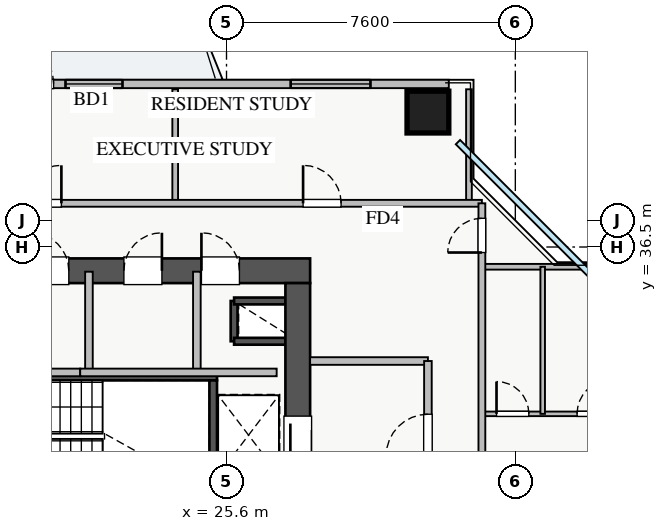
"""IFC4 building model, lengths in metres.
Left out: names, types, materials, properties, quantities, classifications, styles, units other than length and angle.
Written with IfcOpenShell. Run it as: python <this file> out.ifc"""

import sys

from ifc_helpers import new_model, si_unit, direction, frame, frame_2d, origin, origin_2d, place, context, subcontext, project, spatial, rectangle, extrude, source, transform, mapped, element, fill, save


model = new_model("IFC4")
c1 = context("Model", 3, precision=1e-05, world=origin(), true_north=direction((0.0, 1.0)))
c2 = subcontext(c1, "Body", "Model", "MODEL_VIEW")
j1 = project(units=[si_unit("LENGTHUNIT", "METRE"), si_unit("PLANEANGLEUNIT", "RADIAN")], contexts=[c1])
p1 = place(None, origin())
s1 = spatial("IfcSite", under=j1, at=p1, CompositionType="ELEMENT")
p2 = place(p1, origin())
s2 = spatial("IfcBuilding", under=s1, at=p2, CompositionType="ELEMENT")
p3 = place(p2, frame((0.0, 0.0, 110.0)))
s3 = spatial("IfcBuildingStorey", under=s2, at=p3, CompositionType="ELEMENT", Elevation=110.0)
p4 = place(p3, frame((25.8, 34.02, 0.0), z_axis=(0.0, 0.0, 1.0), x_axis=(0.0, 1.0, 0.0)))
e1 = element("IfcWall", 1, at=p4, inside=s3, PredefinedType="SHEAR", context=c2, shape_type="SweptSolid", body=[
    extrude(rectangle(XDim=1.06, YDim=0.18, at=frame_2d((0.53, 0.0))), origin(), (0.0, 0.0, 1.0), 3.07),
])
for number, where, z_axis, x_axis in (
    (2, (25.8, 35.08, 0.0), (0.0, 0.0, 1.0), (1.0, 0.0, 0.0)),
    (3, (25.8, 34.02, 0.0), (0.0, 0.0, 1.0), (1.0, 0.0, 0.0)),
):
    element("IfcWall", number, at=place(p3, frame(where, z_axis=z_axis, x_axis=x_axis)), inside=s3, PredefinedType="SHEAR", context=c2, shape_type="SweptSolid", body=[
        extrude(rectangle(XDim=1.35, YDim=0.18, at=frame_2d((0.675, 0.0))), origin(), (0.0, 0.0, 1.0), 3.07),
    ])
p5 = place(p3, frame((18.2, 33.09, 0.0), z_axis=(0.0, 0.0, 1.0), x_axis=(1.0, 0.0, 0.0)))
e4 = element("IfcWall", 4, at=p5, inside=s3, PredefinedType="SHEAR", context=c2, shape_type="SweptSolid", body=[
    extrude(rectangle(XDim=7.15, YDim=0.2, at=frame_2d((3.575, 0.0))), origin(), (0.0, 0.0, 1.0), 3.25),
])
p6 = place(p5, frame((0.35, 0.0, 0.0)))
e5 = element("IfcOpeningElement", 5, at=p6, cuts=e4, PredefinedType="OPENING", context=c2, shape_type="SweptSolid", body=[
    extrude(rectangle(XDim=1.1, YDim=2.05, at=frame_2d((0.55, 1.025))), frame((0.0, 0.11, 0.0), z_axis=(0.0, -1.0, 0.0), x_axis=(1.0, 0.0, 0.0)), (0.0, 0.0, 1.0), 0.22),
])
p7 = place(p3, frame((25.25, 30.05, 0.0), z_axis=(0.0, 0.0, 1.0), x_axis=(0.0, 1.0, 0.0)))
e6 = element("IfcWall", 6, at=p7, inside=s3, PredefinedType="SHEAR", context=c2, shape_type="SweptSolid", body=[
    extrude(rectangle(XDim=2.94, YDim=0.2, at=frame_2d((1.47, 0.0))), origin(), (0.0, 0.0, 1.0), 3.25),
])
p8 = place(p3, frame((10.2, 35.875, 0.0), z_axis=(0.0, 0.0, 1.0), x_axis=(1.0, 0.0, 0.0)))
e7 = element("IfcWall", 7, at=p8, inside=s3, PredefinedType="SHEAR", context=c2, shape_type="SweptSolid", body=[
    extrude(rectangle(XDim=17.6, YDim=0.65, at=frame_2d((8.8, 0.0))), origin(), (0.0, 0.0, 1.0), 3.25),
])
p9 = place(p8, frame((1.15, 0.0, 0.0)))
e8 = element("IfcOpeningElement", 8, at=p9, cuts=e7, PredefinedType="OPENING", context=c2, shape_type="SweptSolid", body=[
    extrude(rectangle(XDim=1.1, YDim=2.05, at=frame_2d((0.55, 1.025))), frame((0.0, 0.335, 0.0), z_axis=(0.0, -1.0, 0.0), x_axis=(1.0, 0.0, 0.0)), (0.0, 0.0, 1.0), 0.67),
])
p10 = place(p8, frame((8.3, 0.0, 0.0)))
e9 = element("IfcOpeningElement", 9, at=p10, cuts=e7, PredefinedType="OPENING", context=c2, shape_type="SweptSolid", body=[
    extrude(rectangle(XDim=1.1, YDim=2.05, at=frame_2d((0.55, 1.025))), frame((0.0, 0.335, 0.0), z_axis=(0.0, -1.0, 0.0), x_axis=(1.0, 0.0, 0.0)), (0.0, 0.0, 1.0), 0.67),
])
p11 = place(p8, frame((4.9, 0.0, 0.0)))
e10 = element("IfcOpeningElement", 10, at=p11, cuts=e7, PredefinedType="OPENING", context=c2, shape_type="SweptSolid", body=[
    extrude(rectangle(XDim=1.1, YDim=2.05, at=frame_2d((0.55, 1.025))), frame((0.0, 0.335, 0.0), z_axis=(0.0, -1.0, 0.0), x_axis=(1.0, 0.0, 0.0)), (0.0, 0.0, 1.0), 0.67),
])
p12 = place(p8, frame((14.74, 0.0, 0.0)))
e11 = element("IfcOpeningElement", 11, at=p12, cuts=e7, PredefinedType="OPENING", context=c2, shape_type="SweptSolid", body=[
    extrude(rectangle(XDim=1.0, YDim=2.05, at=frame_2d((0.5, 1.025))), frame((0.0, 0.335, 0.0), z_axis=(0.0, -1.0, 0.0), x_axis=(1.0, 0.0, 0.0)), (0.0, 0.0, 1.0), 0.67),
])
p13 = place(p8, frame((10.25, 0.0, 0.0)))
e12 = element("IfcOpeningElement", 12, at=p13, cuts=e7, PredefinedType="OPENING", context=c2, shape_type="SweptSolid", body=[
    extrude(rectangle(XDim=1.0, YDim=2.05, at=frame_2d((0.5, 1.025))), frame((0.0, 0.335, 0.0), z_axis=(0.0, -1.0, 0.0), x_axis=(1.0, 0.0, 0.0)), (0.0, 0.0, 1.0), 0.67),
])
p14 = place(p8, frame((12.7, 0.0, 0.0)))
e13 = element("IfcOpeningElement", 13, at=p14, cuts=e7, PredefinedType="OPENING", context=c2, shape_type="SweptSolid", body=[
    extrude(rectangle(XDim=1.0, YDim=2.05, at=frame_2d((0.5, 1.025))), frame((0.0, 0.335, 0.0), z_axis=(0.0, -1.0, 0.0), x_axis=(1.0, 0.0, 0.0)), (0.0, 0.0, 1.0), 0.67),
])
p15 = place(p3, frame((27.475, 29.65, 0.0), z_axis=(0.0, 0.0, 1.0), x_axis=(0.0, 1.0, 0.0)))
e14 = element("IfcWall", 14, at=p15, inside=s3, PredefinedType="SHEAR", context=c2, shape_type="SweptSolid", body=[
    extrude(rectangle(XDim=5.9, YDim=0.65, at=frame_2d((2.95, 0.0))), origin(), (0.0, 0.0, 1.0), 3.25),
])
p16 = place(p15, frame((1.1, 0.0, 0.0)))
e15 = element("IfcOpeningElement", 15, at=p16, cuts=e14, PredefinedType="OPENING", context=c2, shape_type="SweptSolid", body=[
    extrude(rectangle(XDim=1.3, YDim=2.05, at=frame_2d((0.65, 1.025))), frame((0.0, 0.335, 0.0), z_axis=(0.0, -1.0, 0.0), x_axis=(1.0, 0.0, 0.0)), (0.0, 0.0, 1.0), 0.67),
])
m1 = source(origin(), c2, "Body", "SweptSolid", [
    extrude(rectangle(XDim=1.1, YDim=1.1, at=origin_2d()), origin(), (0.0, 0.0, 1.0), 3.25),
])
p17 = place(p3, frame((30.9, 40.05, 0.0), z_axis=(0.0, 0.0, 1.0), x_axis=(1.0, 0.0, 0.0)))
e16 = element("IfcColumn", 16, at=p17, inside=s3, PredefinedType="COLUMN", context=c2, shape_type="MappedRepresentation", body=[
    mapped(m1, transform((0.0, 0.0, 0.0), x_axis=(1.0, 0.0, 0.0), y_axis=(0.0, 1.0, 0.0), z_axis=(0.0, 0.0, 1.0), scale=1.0)),
])
p18 = place(p3, frame((6.55, 40.79, 0.0), z_axis=(0.0, 0.0, 1.0), x_axis=(1.0, 0.0, 0.0)))
e17 = element("IfcWall", 17, at=p18, inside=s3, PredefinedType="STANDARD", context=c2, shape_type="SweptSolid", body=[
    extrude(rectangle(XDim=24.9, YDim=0.22, at=frame_2d((12.45, 0.0))), origin(), (0.0, 0.0, 1.0), 2.61),
])
p19 = place(p18, frame((13.3, 0.0, 0.0)))
e18 = element("IfcOpeningElement", 18, at=p19, cuts=e17, PredefinedType="OPENING", context=c2, shape_type="SweptSolid", body=[
    extrude(rectangle(XDim=1.2, YDim=2.1, at=frame_2d((0.6, 1.05))), frame((0.0, 0.12, 0.0), z_axis=(0.0, -1.0, 0.0), x_axis=(1.0, 0.0, 0.0)), (0.0, 0.0, 1.0), 0.24),
])
p20 = place(p18, frame((0.373, 0.0, 0.9)))
e19 = element("IfcOpeningElement", 19, at=p20, cuts=e17, PredefinedType="OPENING", context=c2, shape_type="SweptSolid", body=[
    extrude(rectangle(XDim=1.5, YDim=1.5, at=frame_2d((0.75, 0.75))), frame((0.0, 0.12, 0.0), z_axis=(0.0, -1.0, 0.0), x_axis=(1.0, 0.0, 0.0)), (0.0, 0.0, 1.0), 0.24),
])
p21 = place(p18, frame((8.438, 0.0, 0.9)))
e20 = element("IfcOpeningElement", 20, at=p21, cuts=e17, PredefinedType="OPENING", context=c2, shape_type="SweptSolid", body=[
    extrude(rectangle(XDim=1.8, YDim=1.45, at=frame_2d((0.9, 0.725))), frame((0.0, 0.12, 0.0), z_axis=(0.0, -1.0, 0.0), x_axis=(1.0, 0.0, 0.0)), (0.0, 0.0, 1.0), 0.24),
])
p22 = place(p18, frame((14.813, 0.0, 0.9)))
e21 = element("IfcOpeningElement", 21, at=p22, cuts=e17, PredefinedType="OPENING", context=c2, shape_type="SweptSolid", body=[
    extrude(rectangle(XDim=1.5, YDim=1.45, at=frame_2d((0.75, 0.725))), frame((0.0, 0.12, 0.0), z_axis=(0.0, -1.0, 0.0), x_axis=(1.0, 0.0, 0.0)), (0.0, 0.0, 1.0), 0.24),
])
p23 = place(p18, frame((20.738, 0.0, 0.9)))
e22 = element("IfcOpeningElement", 22, at=p23, cuts=e17, PredefinedType="OPENING", context=c2, shape_type="SweptSolid", body=[
    extrude(rectangle(XDim=2.1, YDim=1.48, at=frame_2d((1.05, 0.74))), frame((0.0, 0.12, 0.0), z_axis=(0.0, -1.0, 0.0), x_axis=(1.0, 0.0, 0.0)), (0.0, 0.0, 1.0), 0.24),
])
p24 = place(p18, frame((4.152, 0.0, 0.9)))
e23 = element("IfcOpeningElement", 23, at=p24, cuts=e17, PredefinedType="OPENING", context=c2, shape_type="SweptSolid", body=[
    extrude(rectangle(XDim=2.4, YDim=1.5, at=frame_2d((1.2, 0.75))), frame((0.0, 0.12, 0.0), z_axis=(0.0, -1.0, 0.0), x_axis=(1.0, 0.0, 0.0)), (0.0, 0.0, 1.0), 0.24),
])
p25 = place(p3, frame((27.8, 33.5, 0.0), z_axis=(0.0, 0.0, 1.0), x_axis=(1.0, 0.0, 0.0)))
e24 = element("IfcWall", 24, at=p25, inside=s3, PredefinedType="PARTITIONING", context=c2, shape_type="SweptSolid", body=[
    extrude(rectangle(XDim=3.1, YDim=0.2, at=frame_2d((1.55, 0.0))), origin(), (0.0, 0.0, 1.0), 3.07),
])
p26 = place(p3, frame((30.9, 29.6, 0.0), z_axis=(0.0, 0.0, 1.0), x_axis=(0.0, 1.0, 0.0)))
e25 = element("IfcWall", 25, at=p26, inside=s3, PredefinedType="PARTITIONING", context=c2, shape_type="SweptSolid", body=[
    extrude(rectangle(XDim=3.9, YDim=0.2, at=frame_2d((1.95, 0.0))), origin(), (0.0, 0.0, 1.0), 3.07),
])
p27 = place(p26, frame((1.4, 0.0, 0.0)))
e26 = element("IfcOpeningElement", 26, at=p27, cuts=e25, PredefinedType="OPENING", context=c2, shape_type="SweptSolid", body=[
    extrude(rectangle(XDim=1.1, YDim=2.05, at=frame_2d((0.55, 1.025))), frame((0.0, 0.11, 0.0), z_axis=(0.0, -1.0, 0.0), x_axis=(1.0, 0.0, 0.0)), (0.0, 0.0, 1.0), 0.22),
])
p28 = place(p3, frame((24.82, 33.2, 0.0), z_axis=(0.0, 0.0, 1.0), x_axis=(0.0, 1.0, 0.0)))
e27 = element("IfcWall", 27, at=p28, inside=s3, PredefinedType="PARTITIONING", context=c2, shape_type="SweptSolid", body=[
    extrude(rectangle(XDim=2.65, YDim=0.2, at=frame_2d((1.325, 0.0))), origin(), (0.0, 0.0, 1.0), 3.07),
])
p29 = place(p3, frame((19.88, 33.2, 0.0), z_axis=(0.0, 0.0, 1.0), x_axis=(1.0, 0.0, 0.0)))
e28 = element("IfcWall", 28, at=p29, inside=s3, PredefinedType="PARTITIONING", context=c2, shape_type="SweptSolid", body=[
    extrude(rectangle(XDim=1.87, YDim=0.2, at=frame_2d((0.935, 0.0))), origin(), (0.0, 0.0, 1.0), 3.07),
])
p30 = place(p3, frame((21.98, 33.2, 0.0), z_axis=(0.0, 0.0, 1.0), x_axis=(0.0, 1.0, 0.0)))
e29 = element("IfcWall", 29, at=p30, inside=s3, PredefinedType="PARTITIONING", context=c2, shape_type="SweptSolid", body=[
    extrude(rectangle(XDim=2.65, YDim=0.2, at=frame_2d((1.325, 0.0))), origin(), (0.0, 0.0, 1.0), 3.07),
])
p31 = place(p3, frame((21.75, 33.2, 0.0), z_axis=(0.0, 0.0, 1.0), x_axis=(1.0, 0.0, 0.0)))
e30 = element("IfcWall", 30, at=p31, inside=s3, PredefinedType="PARTITIONING", context=c2, shape_type="SweptSolid", body=[
    extrude(rectangle(XDim=5.17, YDim=0.2, at=frame_2d((2.585, 0.0))), origin(), (0.0, 0.0, 1.0), 3.07),
])
for number, where, z_axis, x_axis in (
    (31, (24.25, 37.65, 0.0), (0.0, 0.0, 1.0), (0.0, 1.0, 0.0)),
    (32, (31.98, 37.65, 0.0), (0.0, 0.0, 1.0), (0.0, 1.0, 0.0)),
):
    element("IfcWall", number, at=place(p3, frame(where, z_axis=z_axis, x_axis=x_axis)), inside=s3, PredefinedType="PARTITIONING", context=c2, shape_type="SweptSolid", body=[
        extrude(rectangle(XDim=3.0, YDim=0.15, at=frame_2d((1.5, 0.0))), origin(), (0.0, 0.0, 1.0), 3.07),
    ])
p32 = place(p3, frame((8.78, 37.65, 0.0), z_axis=(0.0, 0.0, 1.0), x_axis=(1.0, 0.0, 0.0)))
e33 = element("IfcWall", 33, at=p32, inside=s3, PredefinedType="PARTITIONING", context=c2, shape_type="SweptSolid", body=[
    extrude(rectangle(XDim=23.54, YDim=0.18, at=frame_2d((11.77, 0.0))), origin(), (0.0, 0.0, 1.0), 3.07),
])
p33 = place(p32, frame((3.74, 0.0, 0.0)))
e34 = element("IfcOpeningElement", 34, at=p33, cuts=e33, PredefinedType="OPENING", context=c2, shape_type="SweptSolid", body=[
    extrude(rectangle(XDim=1.0, YDim=2.05, at=frame_2d((0.5, 1.025))), frame((0.0, 0.1, 0.0), z_axis=(0.0, -1.0, 0.0), x_axis=(1.0, 0.0, 0.0)), (0.0, 0.0, 1.0), 0.2),
])
p34 = place(p32, frame((11.475, 0.0, 0.0)))
e35 = element("IfcOpeningElement", 35, at=p34, cuts=e33, PredefinedType="OPENING", context=c2, shape_type="SweptSolid", body=[
    extrude(rectangle(XDim=1.0, YDim=2.05, at=frame_2d((0.5, 1.025))), frame((0.0, 0.1, 0.0), z_axis=(0.0, -1.0, 0.0), x_axis=(1.0, 0.0, 0.0)), (0.0, 0.0, 1.0), 0.2),
])
p35 = place(p32, frame((18.835, 0.0, 0.0)))
e36 = element("IfcOpeningElement", 36, at=p35, cuts=e33, PredefinedType="OPENING", context=c2, shape_type="SweptSolid", body=[
    extrude(rectangle(XDim=1.0, YDim=2.05, at=frame_2d((0.5, 1.025))), frame((0.0, 0.1, 0.0), z_axis=(0.0, -1.0, 0.0), x_axis=(1.0, 0.0, 0.0)), (0.0, 0.0, 1.0), 0.2),
])
p36 = place(p3, frame((32.32, 35.98, 0.0), z_axis=(0.0, 0.0, 1.0), x_axis=(1.0, 0.0, 0.0)))
e37 = element("IfcWall", 37, at=p36, inside=s3, PredefinedType="PARTITIONING", context=c2, shape_type="SweptSolid", body=[
    extrude(rectangle(XDim=4.33, YDim=0.15, at=frame_2d((2.165, 0.0))), origin(), (0.0, 0.0, 1.0), 3.07),
])
p37 = place(p3, frame((32.32, 32.11, 0.0), z_axis=(0.0, 0.0, 1.0), x_axis=(1.0, 0.0, 0.0)))
e38 = element("IfcWall", 38, at=p37, inside=s3, PredefinedType="PLUMBINGWALL", context=c2, shape_type="SweptSolid", body=[
    extrude(rectangle(XDim=4.33, YDim=0.12, at=frame_2d((2.165, 0.0))), origin(), (0.0, 0.0, 1.0), 3.07),
])
p38 = place(p37, frame((0.385, 0.0, 0.0)))
e39 = element("IfcOpeningElement", 39, at=p38, cuts=e38, PredefinedType="OPENING", context=c2, shape_type="SweptSolid", body=[
    extrude(rectangle(XDim=0.85, YDim=2.05, at=frame_2d((0.425, 1.025))), frame((0.0, 0.07, 0.0), z_axis=(0.0, -1.0, 0.0), x_axis=(1.0, 0.0, 0.0)), (0.0, 0.0, 1.0), 0.14),
])
p39 = place(p37, frame((2.505, 0.0, 0.0)))
e40 = element("IfcOpeningElement", 40, at=p39, cuts=e38, PredefinedType="OPENING", context=c2, shape_type="SweptSolid", body=[
    extrude(rectangle(XDim=0.9, YDim=2.05, at=frame_2d((0.45, 1.025))), frame((0.0, 0.07, 0.0), z_axis=(0.0, -1.0, 0.0), x_axis=(1.0, 0.0, 0.0)), (0.0, 0.0, 1.0), 0.14),
])
p40 = place(p3, frame((33.92, 32.11, 0.0), z_axis=(0.0, 0.0, 1.0), x_axis=(0.0, 1.0, 0.0)))
e41 = element("IfcWall", 41, at=p40, inside=s3, PredefinedType="PLUMBINGWALL", context=c2, shape_type="SweptSolid", body=[
    extrude(rectangle(XDim=3.87, YDim=0.12, at=frame_2d((1.935, 0.0))), origin(), (0.0, 0.0, 1.0), 3.07),
])
p41 = place(p3, frame((32.32, 8.31, 0.0), z_axis=(0.0, 0.0, 1.0), x_axis=(0.0, 1.0, 0.0)))
e42 = element("IfcWall", 42, at=p41, inside=s3, PredefinedType="PARTITIONING", context=c2, shape_type="SweptSolid", body=[
    extrude(rectangle(XDim=29.34, YDim=0.18, at=frame_2d((14.67, 0.0))), origin(), (0.0, 0.0, 1.0), 3.07),
])
p42 = place(p41, frame((28.045, 0.0, 0.0)))
e43 = element("IfcOpeningElement", 43, at=p42, cuts=e42, PredefinedType="OPENING", context=c2, shape_type="SweptSolid", body=[
    extrude(rectangle(XDim=0.9, YDim=2.05, at=frame_2d((0.45, 1.025))), frame((0.0, 0.1, 0.0), z_axis=(0.0, -1.0, 0.0), x_axis=(1.0, 0.0, 0.0)), (0.0, 0.0, 1.0), 0.2),
])
p43 = place(p41, frame((0.415, 0.0, 0.0)))
e44 = element("IfcOpeningElement", 44, at=p43, cuts=e42, PredefinedType="OPENING", context=c2, shape_type="SweptSolid", body=[
    extrude(rectangle(XDim=0.9, YDim=2.05, at=frame_2d((0.45, 1.025))), frame((0.0, 0.1, 0.0), z_axis=(0.0, -1.0, 0.0), x_axis=(1.0, 0.0, 0.0)), (0.0, 0.0, 1.0), 0.2),
])
p44 = place(p41, frame((5.385, 0.0, 0.0)))
e45 = element("IfcOpeningElement", 45, at=p44, cuts=e42, PredefinedType="OPENING", context=c2, shape_type="SweptSolid", body=[
    extrude(rectangle(XDim=1.0, YDim=2.05, at=frame_2d((0.5, 1.025))), frame((0.0, 0.1, 0.0), z_axis=(0.0, -1.0, 0.0), x_axis=(1.0, 0.0, 0.0)), (0.0, 0.0, 1.0), 0.2),
])
p45 = place(p41, frame((11.735, 0.0, 0.0)))
e46 = element("IfcOpeningElement", 46, at=p45, cuts=e42, PredefinedType="OPENING", context=c2, shape_type="SweptSolid", body=[
    extrude(rectangle(XDim=1.0, YDim=2.05, at=frame_2d((0.5, 1.025))), frame((0.0, 0.1, 0.0), z_axis=(0.0, -1.0, 0.0), x_axis=(1.0, 0.0, 0.0)), (0.0, 0.0, 1.0), 0.2),
])
p46 = place(p41, frame((20.835, 0.0, 0.0)))
e47 = element("IfcOpeningElement", 47, at=p46, cuts=e42, PredefinedType="OPENING", context=c2, shape_type="SweptSolid", body=[
    extrude(rectangle(XDim=1.0, YDim=2.05, at=frame_2d((0.5, 1.025))), frame((0.0, 0.1, 0.0), z_axis=(0.0, -1.0, 0.0), x_axis=(1.0, 0.0, 0.0)), (0.0, 0.0, 1.0), 0.2),
])
m2 = source(origin(), c2, "Body", "SweptSolid", [
    extrude(rectangle(XDim=1.2, YDim=2.1, at=frame_2d((0.6, 1.05))), frame((0.0, 0.025, 0.0), z_axis=(0.0, -1.0, 0.0), x_axis=(1.0, 0.0, 0.0)), (0.0, 0.0, 1.0), 0.05),
])
p47 = place(p19, origin())
e48 = element("IfcDoor", 48, at=p47, inside=s3, OperationType="SINGLE_SWING_LEFT", PredefinedType="DOOR", context=c2, shape_type="MappedRepresentation", body=[
    mapped(m2, transform((0.0, 0.0, 0.0), x_axis=(1.0, 0.0, 0.0), y_axis=(0.0, 1.0, 0.0), z_axis=(0.0, 0.0, 1.0), scale=1.0)),
])
fill(e18, e48)
m3 = source(origin(), c2, "Body", "SweptSolid", [
    extrude(rectangle(XDim=1.5, YDim=1.45, at=frame_2d((0.75, 0.725))), frame((0.0, 0.03, 0.0), z_axis=(0.0, -1.0, 0.0), x_axis=(1.0, 0.0, 0.0)), (0.0, 0.0, 1.0), 0.06),
])
p48 = place(p22, origin())
e49 = element("IfcWindow", 49, at=p48, inside=s3, PartitioningType="DOUBLE_PANEL_VERTICAL", PredefinedType="WINDOW", context=c2, shape_type="MappedRepresentation", body=[
    mapped(m3, transform((0.0, 0.0, 0.0), x_axis=(1.0, 0.0, 0.0), y_axis=(0.0, 1.0, 0.0), z_axis=(0.0, 0.0, 1.0), scale=1.0)),
])
fill(e21, e49)
m4 = source(origin(), c2, "Body", "SweptSolid", [
    extrude(rectangle(XDim=2.1, YDim=1.48, at=frame_2d((1.05, 0.74))), frame((0.0, 0.03, 0.0), z_axis=(0.0, -1.0, 0.0), x_axis=(1.0, 0.0, 0.0)), (0.0, 0.0, 1.0), 0.06),
])
p49 = place(p23, origin())
e50 = element("IfcWindow", 50, at=p49, inside=s3, PartitioningType="TRIPLE_PANEL_VERTICAL", PredefinedType="WINDOW", context=c2, shape_type="MappedRepresentation", body=[
    mapped(m4, transform((0.0, 0.0, 0.0), x_axis=(1.0, 0.0, 0.0), y_axis=(0.0, 1.0, 0.0), z_axis=(0.0, 0.0, 1.0), scale=1.0)),
])
fill(e22, e50)
m5 = source(origin(), c2, "Body", "SweptSolid", [
    extrude(rectangle(XDim=1.3, YDim=2.05, at=frame_2d((0.65, 1.025))), frame((0.0, 0.025, 0.0), z_axis=(0.0, -1.0, 0.0), x_axis=(1.0, 0.0, 0.0)), (0.0, 0.0, 1.0), 0.05),
])
p50 = place(p16, origin())
e51 = element("IfcDoor", 51, at=p50, inside=s3, OperationType="SLIDING_TO_LEFT", PredefinedType="DOOR", context=c2, shape_type="MappedRepresentation", body=[
    mapped(m5, transform((0.0, 0.0, 0.0), x_axis=(1.0, 0.0, 0.0), y_axis=(0.0, 1.0, 0.0), z_axis=(0.0, 0.0, 1.0), scale=1.0)),
])
fill(e15, e51)
m6 = source(origin(), c2, "Body", "SweptSolid", [
    extrude(rectangle(XDim=1.0, YDim=2.05, at=frame_2d((0.5, 1.025))), frame((0.0, 0.025, 0.0), z_axis=(0.0, -1.0, 0.0), x_axis=(1.0, 0.0, 0.0)), (0.0, 0.0, 1.0), 0.05),
])
p51 = place(p12, origin())
e52 = element("IfcDoor", 52, at=p51, inside=s3, OperationType="SINGLE_SWING_LEFT", PredefinedType="DOOR", context=c2, shape_type="MappedRepresentation", body=[
    mapped(m6, transform((0.0, 0.0, 0.0), x_axis=(1.0, 0.0, 0.0), y_axis=(0.0, 1.0, 0.0), z_axis=(0.0, 0.0, 1.0), scale=1.0)),
])
fill(e11, e52)
p52 = place(p13, origin())
e53 = element("IfcDoor", 53, at=p52, inside=s3, OperationType="SINGLE_SWING_LEFT", PredefinedType="DOOR", context=c2, shape_type="MappedRepresentation", body=[
    mapped(m6, transform((0.0, 0.0, 0.0), x_axis=(1.0, 0.0, 0.0), y_axis=(0.0, 1.0, 0.0), z_axis=(0.0, 0.0, 1.0), scale=1.0)),
])
fill(e12, e53)
p53 = place(p14, origin())
e54 = element("IfcDoor", 54, at=p53, inside=s3, OperationType="SINGLE_SWING_RIGHT", PredefinedType="DOOR", context=c2, shape_type="MappedRepresentation", body=[
    mapped(m6, transform((0.0, 0.0, 0.0), x_axis=(1.0, 0.0, 0.0), y_axis=(0.0, 1.0, 0.0), z_axis=(0.0, 0.0, 1.0), scale=1.0)),
])
fill(e13, e54)
m7 = source(origin(), c2, "Body", "SweptSolid", [
    extrude(rectangle(XDim=1.1, YDim=2.05, at=frame_2d((0.55, 1.025))), frame((0.0, 0.025, 0.0), z_axis=(0.0, -1.0, 0.0), x_axis=(1.0, 0.0, 0.0)), (0.0, 0.0, 1.0), 0.05),
])
p54 = place(p27, origin())
e55 = element("IfcDoor", 55, at=p54, inside=s3, OperationType="SINGLE_SWING_LEFT", PredefinedType="DOOR", context=c2, shape_type="MappedRepresentation", body=[
    mapped(m7, transform((0.0, 0.0, 0.0), x_axis=(1.0, 0.0, 0.0), y_axis=(0.0, 1.0, 0.0), z_axis=(0.0, 0.0, 1.0), scale=1.0)),
])
fill(e26, e55)
p55 = place(p34, origin())
e56 = element("IfcDoor", 56, at=p55, inside=s3, OperationType="SINGLE_SWING_RIGHT", PredefinedType="DOOR", context=c2, shape_type="MappedRepresentation", body=[
    mapped(m6, transform((0.0, 0.0, 0.0), x_axis=(1.0, 0.0, 0.0), y_axis=(0.0, 1.0, 0.0), z_axis=(0.0, 0.0, 1.0), scale=1.0)),
])
fill(e35, e56)
p56 = place(p35, origin())
e57 = element("IfcDoor", 57, at=p56, inside=s3, OperationType="SINGLE_SWING_LEFT", PredefinedType="DOOR", context=c2, shape_type="MappedRepresentation", body=[
    mapped(m6, transform((0.0, 0.0, 0.0), x_axis=(1.0, 0.0, 0.0), y_axis=(0.0, 1.0, 0.0), z_axis=(0.0, 0.0, 1.0), scale=1.0)),
])
fill(e36, e57)
m8 = source(origin(), c2, "Body", "SweptSolid", [
    extrude(rectangle(XDim=0.85, YDim=2.05, at=frame_2d((0.425, 1.025))), frame((0.0, 0.025, 0.0), z_axis=(0.0, -1.0, 0.0), x_axis=(1.0, 0.0, 0.0)), (0.0, 0.0, 1.0), 0.05),
])
p57 = place(p38, origin())
e58 = element("IfcDoor", 58, at=p57, inside=s3, OperationType="SINGLE_SWING_LEFT", PredefinedType="DOOR", context=c2, shape_type="MappedRepresentation", body=[
    mapped(m8, transform((0.0, 0.0, 0.0), x_axis=(1.0, 0.0, 0.0), y_axis=(0.0, 1.0, 0.0), z_axis=(0.0, 0.0, 1.0), scale=1.0)),
])
fill(e39, e58)
m9 = source(origin(), c2, "Body", "SweptSolid", [
    extrude(rectangle(XDim=0.9, YDim=2.05, at=frame_2d((0.45, 1.025))), frame((0.0, 0.025, 0.0), z_axis=(0.0, -1.0, 0.0), x_axis=(1.0, 0.0, 0.0)), (0.0, 0.0, 1.0), 0.05),
])
p58 = place(p39, origin())
e59 = element("IfcDoor", 59, at=p58, inside=s3, OperationType="SINGLE_SWING_RIGHT", PredefinedType="DOOR", context=c2, shape_type="MappedRepresentation", body=[
    mapped(m9, transform((0.0, 0.0, 0.0), x_axis=(1.0, 0.0, 0.0), y_axis=(0.0, 1.0, 0.0), z_axis=(0.0, 0.0, 1.0), scale=1.0)),
])
fill(e40, e59)
p59 = place(p42, origin())
e60 = element("IfcDoor", 60, at=p59, inside=s3, OperationType="SINGLE_SWING_LEFT", PredefinedType="DOOR", context=c2, shape_type="MappedRepresentation", body=[
    mapped(m9, transform((0.0, 0.0, 0.0), x_axis=(1.0, 0.0, 0.0), y_axis=(0.0, 1.0, 0.0), z_axis=(0.0, 0.0, 1.0), scale=1.0)),
])
fill(e43, e60)
save(model, sys.argv[1])
